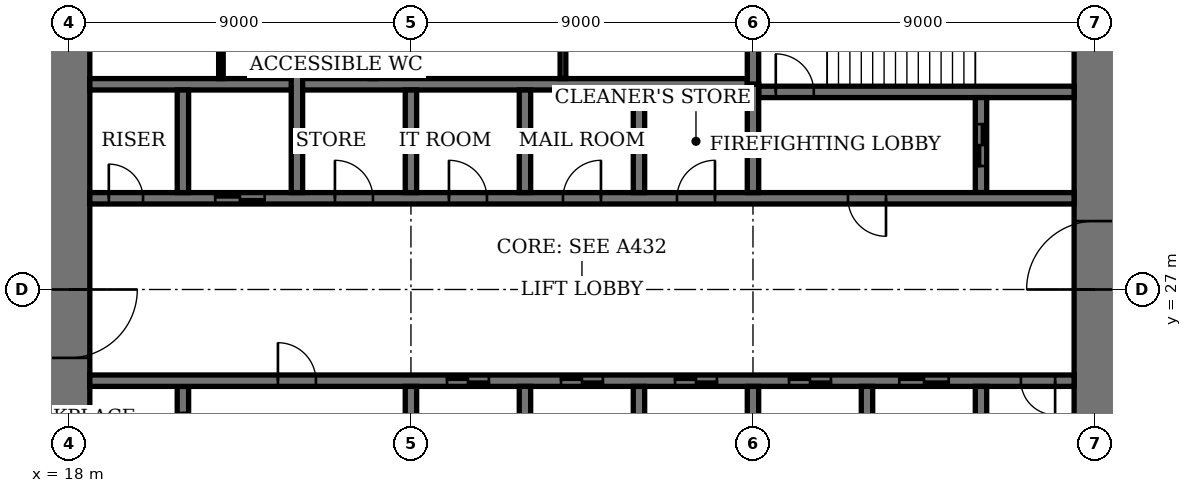
"""IFC4 building model, lengths in metres.
Left out: names, types, materials, properties, quantities, classifications, styles, units other than length and angle.
Written with IfcOpenShell. Run it as: python <this file> out.ifc"""

import sys

from ifc_helpers import new_model, si_unit, direction, frame, frame_2d, origin, place, context, subcontext, project, spatial, rectangle, extrude, element, fill, save


model = new_model("IFC4")
c1 = context("Model", 3, precision=1e-05, world=origin(), true_north=direction((0.0, 1.0)))
c2 = subcontext(c1, "Body", "Model", "MODEL_VIEW")
j1 = project(units=[si_unit("LENGTHUNIT", "METRE"), si_unit("PLANEANGLEUNIT", "RADIAN")], contexts=[c1])
p1 = place(None, origin())
s1 = spatial("IfcSite", under=j1, at=p1, CompositionType="ELEMENT")
p2 = place(p1, origin())
s2 = spatial("IfcBuilding", under=s1, at=p2, CompositionType="ELEMENT")
p3 = place(p2, frame((0.0, 0.0, 303.4)))
s3 = spatial("IfcBuildingStorey", under=s2, at=p3, CompositionType="ELEMENT", Elevation=303.4)
p4 = place(p3, frame((18.0, 35.45, 0.0), z_axis=(0.0, 0.0, 1.0), x_axis=(0.0, -1.0, 0.0)))
e1 = element("IfcWall", 1, at=p4, inside=s3, PredefinedType="SHEAR", context=c2, shape_type="SweptSolid", body=[
    extrude(rectangle(XDim=16.9, YDim=1.1, at=frame_2d((8.45, 0.0))), origin(), (0.0, 0.0, 1.0), 4.0),
])
p5 = place(p4, frame((8.45, 0.0, 0.0)))
e2 = element("IfcOpeningElement", 2, at=p5, cuts=e1, PredefinedType="OPENING", context=c2, shape_type="SweptSolid", body=[
    extrude(rectangle(XDim=1.8, YDim=2.4, at=frame_2d((0.9, 1.2))), frame((0.0, 0.56, 0.0), z_axis=(0.0, -1.0, 0.0), x_axis=(1.0, 0.0, 0.0)), (0.0, 0.0, 1.0), 1.12),
])
p6 = place(p3, frame((45.0, 18.55, 0.0), z_axis=(0.0, 0.0, 1.0), x_axis=(0.0, 1.0, 0.0)))
e3 = element("IfcWall", 3, at=p6, inside=s3, PredefinedType="SHEAR", context=c2, shape_type="SweptSolid", body=[
    extrude(rectangle(XDim=16.9, YDim=1.1, at=frame_2d((8.45, 0.0))), origin(), (0.0, 0.0, 1.0), 4.0),
])
p7 = place(p6, frame((8.45, 0.0, 0.0)))
e4 = element("IfcOpeningElement", 4, at=p7, cuts=e3, PredefinedType="OPENING", context=c2, shape_type="SweptSolid", body=[
    extrude(rectangle(XDim=1.8, YDim=2.4, at=frame_2d((0.9, 1.2))), frame((0.0, 0.56, 0.0), z_axis=(0.0, -1.0, 0.0), x_axis=(1.0, 0.0, 0.0)), (0.0, 0.0, 1.0), 1.12),
])
p8 = place(p3, frame((36.15, 32.2, 0.0), z_axis=(0.0, 0.0, 1.0), x_axis=(1.0, 0.0, 0.0)))
e5 = element("IfcWall", 5, at=p8, inside=s3, PredefinedType="SHEAR", context=c2, shape_type="SweptSolid", body=[
    extrude(rectangle(XDim=8.3, YDim=0.3, at=frame_2d((4.15, 0.0))), origin(), (0.0, 0.0, 1.0), 4.0),
])
p9 = place(p8, frame((0.45, 0.0, 0.0)))
e6 = element("IfcOpeningElement", 6, at=p9, cuts=e5, PredefinedType="OPENING", context=c2, shape_type="SweptSolid", body=[
    extrude(rectangle(XDim=1.0, YDim=2.4, at=frame_2d((0.5, 1.2))), frame((0.0, 0.16, 0.0), z_axis=(0.0, -1.0, 0.0), x_axis=(1.0, 0.0, 0.0)), (0.0, 0.0, 1.0), 0.32),
])
p10 = place(p3, frame((36.0, 32.4, 0.0), z_axis=(0.0, 0.0, 1.0), x_axis=(0.0, 1.0, 0.0)))
e7 = element("IfcWall", 7, at=p10, inside=s3, PredefinedType="SHEAR", context=c2, shape_type="SweptSolid", body=[
    extrude(rectangle(XDim=3.05, YDim=0.3, at=frame_2d((1.525, 0.0))), origin(), (0.0, 0.0, 1.0), 4.0),
])
p11 = place(p3, frame((21.0, 21.95, 0.0), z_axis=(0.0, 0.0, 1.0), x_axis=(0.0, 1.0, 0.0)))
e8 = element("IfcWall", 8, at=p11, inside=s3, PredefinedType="SHEAR", context=c2, shape_type="SweptSolid", body=[
    extrude(rectangle(XDim=2.5, YDim=0.3, at=frame_2d((1.25, 0.0))), origin(), (0.0, 0.0, 1.0), 4.0),
])
p12 = place(p11, frame((0.7, 0.0, 0.0)))
e9 = element("IfcOpeningElement", 9, at=p12, cuts=e8, PredefinedType="OPENING", context=c2, shape_type="SweptSolid", body=[
    extrude(rectangle(XDim=1.1, YDim=2.4, at=frame_2d((0.55, 1.2))), frame((0.0, 0.16, 0.0), z_axis=(0.0, -1.0, 0.0), x_axis=(1.0, 0.0, 0.0)), (0.0, 0.0, 1.0), 0.32),
])
p13 = place(p3, frame((42.0, 29.55, 0.0), z_axis=(0.0, 0.0, 1.0), x_axis=(0.0, 1.0, 0.0)))
e10 = element("IfcWall", 10, at=p13, inside=s3, PredefinedType="SHEAR", context=c2, shape_type="SweptSolid", body=[
    extrude(rectangle(XDim=2.5, YDim=0.3, at=frame_2d((1.25, 0.0))), origin(), (0.0, 0.0, 1.0), 4.0),
])
p14 = place(p13, frame((0.7, 0.0, 0.0)))
e11 = element("IfcOpeningElement", 11, at=p14, cuts=e10, PredefinedType="OPENING", context=c2, shape_type="SweptSolid", body=[
    extrude(rectangle(XDim=1.1, YDim=2.4, at=frame_2d((0.55, 1.2))), frame((0.0, 0.16, 0.0), z_axis=(0.0, -1.0, 0.0), x_axis=(1.0, 0.0, 0.0)), (0.0, 0.0, 1.0), 0.32),
])
p15 = place(p3, frame((18.55, 24.6, 0.0), z_axis=(0.0, 0.0, 1.0), x_axis=(1.0, 0.0, 0.0)))
e12 = element("IfcWall", 12, at=p15, inside=s3, PredefinedType="SHEAR", context=c2, shape_type="SweptSolid", body=[
    extrude(rectangle(XDim=25.9, YDim=0.3, at=frame_2d((12.95, 0.0))), origin(), (0.0, 0.0, 1.0), 4.0),
])
p16 = place(p15, frame((4.95, 0.0, 0.0)))
e13 = element("IfcOpeningElement", 13, at=p16, cuts=e12, PredefinedType="OPENING", context=c2, shape_type="SweptSolid", body=[
    extrude(rectangle(XDim=1.0, YDim=2.4, at=frame_2d((0.5, 1.2))), frame((0.0, 0.16, 0.0), z_axis=(0.0, -1.0, 0.0), x_axis=(1.0, 0.0, 0.0)), (0.0, 0.0, 1.0), 0.32),
])
p17 = place(p15, frame((24.5, 0.0, 0.0)))
e14 = element("IfcOpeningElement", 14, at=p17, cuts=e12, PredefinedType="OPENING", context=c2, shape_type="SweptSolid", body=[
    extrude(rectangle(XDim=0.9, YDim=2.1, at=frame_2d((0.45, 1.05))), frame((0.0, 0.16, 0.0), z_axis=(0.0, -1.0, 0.0), x_axis=(1.0, 0.0, 0.0)), (0.0, 0.0, 1.0), 0.32),
])
p18 = place(p15, frame((9.4, 0.0, 0.0)))
e15 = element("IfcOpeningElement", 15, at=p18, cuts=e12, PredefinedType="OPENING", context=c2, shape_type="SweptSolid", body=[
    extrude(rectangle(XDim=1.1, YDim=2.4, at=frame_2d((0.55, 1.2))), frame((0.0, 0.16, 0.0), z_axis=(0.0, -1.0, 0.0), x_axis=(1.0, 0.0, 0.0)), (0.0, 0.0, 1.0), 0.32),
])
p19 = place(p15, frame((12.4, 0.0, 0.0)))
e16 = element("IfcOpeningElement", 16, at=p19, cuts=e12, PredefinedType="OPENING", context=c2, shape_type="SweptSolid", body=[
    extrude(rectangle(XDim=1.1, YDim=2.4, at=frame_2d((0.55, 1.2))), frame((0.0, 0.16, 0.0), z_axis=(0.0, -1.0, 0.0), x_axis=(1.0, 0.0, 0.0)), (0.0, 0.0, 1.0), 0.32),
])
p20 = place(p15, frame((15.4, 0.0, 0.0)))
e17 = element("IfcOpeningElement", 17, at=p20, cuts=e12, PredefinedType="OPENING", context=c2, shape_type="SweptSolid", body=[
    extrude(rectangle(XDim=1.1, YDim=2.4, at=frame_2d((0.55, 1.2))), frame((0.0, 0.16, 0.0), z_axis=(0.0, -1.0, 0.0), x_axis=(1.0, 0.0, 0.0)), (0.0, 0.0, 1.0), 0.32),
])
p21 = place(p15, frame((18.4, 0.0, 0.0)))
e18 = element("IfcOpeningElement", 18, at=p21, cuts=e12, PredefinedType="OPENING", context=c2, shape_type="SweptSolid", body=[
    extrude(rectangle(XDim=1.1, YDim=2.4, at=frame_2d((0.55, 1.2))), frame((0.0, 0.16, 0.0), z_axis=(0.0, -1.0, 0.0), x_axis=(1.0, 0.0, 0.0)), (0.0, 0.0, 1.0), 0.32),
])
p22 = place(p15, frame((21.3, 0.0, 0.0)))
e19 = element("IfcOpeningElement", 19, at=p22, cuts=e12, PredefinedType="OPENING", context=c2, shape_type="SweptSolid", body=[
    extrude(rectangle(XDim=1.3, YDim=2.4, at=frame_2d((0.65, 1.2))), frame((0.0, 0.16, 0.0), z_axis=(0.0, -1.0, 0.0), x_axis=(1.0, 0.0, 0.0)), (0.0, 0.0, 1.0), 0.32),
])
p23 = place(p3, frame((18.55, 29.4, 0.0), z_axis=(0.0, 0.0, 1.0), x_axis=(1.0, 0.0, 0.0)))
e20 = element("IfcWall", 20, at=p23, inside=s3, PredefinedType="SHEAR", context=c2, shape_type="SweptSolid", body=[
    extrude(rectangle(XDim=25.9, YDim=0.3, at=frame_2d((12.95, 0.0))), origin(), (0.0, 0.0, 1.0), 4.0),
])
p24 = place(p23, frame((19.95, 0.0, 0.0)))
e21 = element("IfcOpeningElement", 21, at=p24, cuts=e20, PredefinedType="OPENING", context=c2, shape_type="SweptSolid", body=[
    extrude(rectangle(XDim=1.0, YDim=2.4, at=frame_2d((0.5, 1.2))), frame((0.0, 0.16, 0.0), z_axis=(0.0, -1.0, 0.0), x_axis=(1.0, 0.0, 0.0)), (0.0, 0.0, 1.0), 0.32),
])
p25 = place(p23, frame((0.5, 0.0, 0.0)))
e22 = element("IfcOpeningElement", 22, at=p25, cuts=e20, PredefinedType="OPENING", context=c2, shape_type="SweptSolid", body=[
    extrude(rectangle(XDim=0.9, YDim=2.1, at=frame_2d((0.45, 1.05))), frame((0.0, 0.16, 0.0), z_axis=(0.0, -1.0, 0.0), x_axis=(1.0, 0.0, 0.0)), (0.0, 0.0, 1.0), 0.32),
])
p26 = place(p23, frame((15.45, 0.0, 0.0)))
e23 = element("IfcOpeningElement", 23, at=p26, cuts=e20, PredefinedType="OPENING", context=c2, shape_type="SweptSolid", body=[
    extrude(rectangle(XDim=1.0, YDim=2.4, at=frame_2d((0.5, 1.2))), frame((0.0, 0.16, 0.0), z_axis=(0.0, -1.0, 0.0), x_axis=(1.0, 0.0, 0.0)), (0.0, 0.0, 1.0), 0.32),
])
p27 = place(p23, frame((12.45, 0.0, 0.0)))
e24 = element("IfcOpeningElement", 24, at=p27, cuts=e20, PredefinedType="OPENING", context=c2, shape_type="SweptSolid", body=[
    extrude(rectangle(XDim=1.0, YDim=2.4, at=frame_2d((0.5, 1.2))), frame((0.0, 0.16, 0.0), z_axis=(0.0, -1.0, 0.0), x_axis=(1.0, 0.0, 0.0)), (0.0, 0.0, 1.0), 0.32),
])
p28 = place(p23, frame((9.45, 0.0, 0.0)))
e25 = element("IfcOpeningElement", 25, at=p28, cuts=e20, PredefinedType="OPENING", context=c2, shape_type="SweptSolid", body=[
    extrude(rectangle(XDim=1.0, YDim=2.4, at=frame_2d((0.5, 1.2))), frame((0.0, 0.16, 0.0), z_axis=(0.0, -1.0, 0.0), x_axis=(1.0, 0.0, 0.0)), (0.0, 0.0, 1.0), 0.32),
])
p29 = place(p23, frame((6.45, 0.0, 0.0)))
e26 = element("IfcOpeningElement", 26, at=p29, cuts=e20, PredefinedType="OPENING", context=c2, shape_type="SweptSolid", body=[
    extrude(rectangle(XDim=1.0, YDim=2.4, at=frame_2d((0.5, 1.2))), frame((0.0, 0.16, 0.0), z_axis=(0.0, -1.0, 0.0), x_axis=(1.0, 0.0, 0.0)), (0.0, 0.0, 1.0), 0.32),
])
p30 = place(p23, frame((3.3, 0.0, 0.0)))
e27 = element("IfcOpeningElement", 27, at=p30, cuts=e20, PredefinedType="OPENING", context=c2, shape_type="SweptSolid", body=[
    extrude(rectangle(XDim=1.3, YDim=2.4, at=frame_2d((0.65, 1.2))), frame((0.0, 0.16, 0.0), z_axis=(0.0, -1.0, 0.0), x_axis=(1.0, 0.0, 0.0)), (0.0, 0.0, 1.0), 0.32),
])
p31 = place(p3, frame((18.55, 32.4, 0.0), z_axis=(0.0, 0.0, 1.0), x_axis=(1.0, 0.0, 0.0)))
e28 = element("IfcWall", 28, at=p31, inside=s3, PredefinedType="SHEAR", context=c2, shape_type="SweptSolid", body=[
    extrude(rectangle(XDim=17.3, YDim=0.3, at=frame_2d((8.65, 0.0))), origin(), (0.0, 0.0, 1.0), 4.0),
])
for number, where, z_axis, x_axis in (
    (29, (30.0, 21.75, 0.0), (0.0, 0.0, 1.0), (0.0, 1.0, 0.0)),
    (30, (33.0, 29.55, 0.0), (0.0, 0.0, 1.0), (0.0, 1.0, 0.0)),
    (31, (33.0, 21.75, 0.0), (0.0, 0.0, 1.0), (0.0, 1.0, 0.0)),
    (32, (30.0, 29.55, 0.0), (0.0, 0.0, 1.0), (0.0, 1.0, 0.0)),
    (33, (36.0, 21.75, 0.0), (0.0, 0.0, 1.0), (0.0, 1.0, 0.0)),
    (34, (27.0, 29.55, 0.0), (0.0, 0.0, 1.0), (0.0, 1.0, 0.0)),
):
    element("IfcWall", number, at=place(p3, frame(where, z_axis=z_axis, x_axis=x_axis)), inside=s3, PredefinedType="SHEAR", context=c2, shape_type="SweptSolid", body=[
        extrude(rectangle(XDim=2.7, YDim=0.3, at=frame_2d((1.35, 0.0))), origin(), (0.0, 0.0, 1.0), 4.0),
    ])
for number, where, z_axis, x_axis in (
    (35, (39.0, 18.55, 0.0), (0.0, 0.0, 1.0), (0.0, 1.0, 0.0)),
    (36, (24.0, 29.55, 0.0), (0.0, 0.0, 1.0), (0.0, 1.0, 0.0)),
):
    element("IfcWall", number, at=place(p3, frame(where, z_axis=z_axis, x_axis=x_axis)), inside=s3, PredefinedType="SHEAR", context=c2, shape_type="SweptSolid", body=[
        extrude(rectangle(XDim=5.9, YDim=0.3, at=frame_2d((2.95, 0.0))), origin(), (0.0, 0.0, 1.0), 4.0),
    ])
for number, where, z_axis, x_axis in (
    (37, (42.0, 21.75, 0.0), (0.0, 0.0, 1.0), (0.0, 1.0, 0.0)),
    (38, (21.0, 29.55, 0.0), (0.0, 0.0, 1.0), (0.0, 1.0, 0.0)),
):
    element("IfcWall", number, at=place(p3, frame(where, z_axis=z_axis, x_axis=x_axis)), inside=s3, PredefinedType="SHEAR", context=c2, shape_type="SweptSolid", body=[
        extrude(rectangle(XDim=2.7, YDim=0.3, at=frame_2d((1.35, 0.0))), origin(), (0.0, 0.0, 1.0), 4.0),
    ])
for number, where, z_axis, x_axis in (
    (39, (27.0, 21.6, 0.0), (0.0, 0.0, 1.0), (0.0, 1.0, 0.0)),
    (40, (36.0, 29.55, 0.0), (0.0, 0.0, 1.0), (0.0, 1.0, 0.0)),
):
    element("IfcWall", number, at=place(p3, frame(where, z_axis=z_axis, x_axis=x_axis)), inside=s3, PredefinedType="SHEAR", context=c2, shape_type="SweptSolid", body=[
        extrude(rectangle(XDim=2.85, YDim=0.3, at=frame_2d((1.425, 0.0))), origin(), (0.0, 0.0, 1.0), 4.0),
    ])
for number, where, z_axis, x_axis in (
    (41, (31.0, 32.55, 0.0), (0.0, 0.0, 1.0), (0.0, 1.0, 0.0)),
    (42, (26.0, 32.55, 0.0), (0.0, 0.0, 1.0), (0.0, 1.0, 0.0)),
):
    element("IfcWall", number, at=place(p3, frame(where, z_axis=z_axis, x_axis=x_axis)), inside=s3, PredefinedType="PARTITIONING", context=c2, shape_type="SweptSolid", body=[
        extrude(rectangle(XDim=2.9, YDim=0.15, at=frame_2d((1.45, 0.0))), origin(), (0.0, 0.0, 1.0), 3.75),
    ])
p32 = place(p3, frame((22.0, 32.55, 0.0), z_axis=(0.0, 0.0, 1.0), x_axis=(0.0, 1.0, 0.0)))
e43 = element("IfcWall", 43, at=p32, inside=s3, PredefinedType="PARTITIONING", context=c2, shape_type="SweptSolid", body=[
    extrude(rectangle(XDim=2.9, YDim=0.12, at=frame_2d((1.45, 0.0))), origin(), (0.0, 0.0, 1.0), 3.75),
])
p33 = place(p32, frame((0.95, 0.0, 0.0)))
e44 = element("IfcOpeningElement", 44, at=p33, cuts=e43, PredefinedType="OPENING", context=c2, shape_type="SweptSolid", body=[
    extrude(rectangle(XDim=1.0, YDim=2.4, at=frame_2d((0.5, 1.2))), frame((0.0, 0.07, 0.0), z_axis=(0.0, -1.0, 0.0), x_axis=(1.0, 0.0, 0.0)), (0.0, 0.0, 1.0), 0.14),
])
p34 = place(p5, origin())
e45 = element("IfcDoor", 45, at=p34, inside=s3, OperationType="DOUBLE_DOOR_DOUBLE_SWING", PredefinedType="DOOR", context=c2, shape_type="SweptSolid", body=[
    extrude(rectangle(XDim=1.8, YDim=2.4, at=frame_2d((0.9, 1.2))), frame((0.0, 0.03, 0.0), z_axis=(0.0, -1.0, 0.0), x_axis=(1.0, 0.0, 0.0)), (0.0, 0.0, 1.0), 0.06),
    extrude(rectangle(XDim=0.04, YDim=2.4, at=frame_2d((0.02, 1.2))), frame((0.0, 0.55, 0.0), z_axis=(0.0, -1.0, 0.0), x_axis=(1.0, 0.0, 0.0)), (0.0, 0.0, 1.0), 1.1),
    extrude(rectangle(XDim=0.04, YDim=2.4, at=frame_2d((1.78, 1.2))), frame((0.0, 0.55, 0.0), z_axis=(0.0, -1.0, 0.0), x_axis=(1.0, 0.0, 0.0)), (0.0, 0.0, 1.0), 1.1),
    extrude(rectangle(XDim=1.8, YDim=0.04, at=frame_2d((0.9, 2.38))), frame((0.0, 0.55, 0.0), z_axis=(0.0, -1.0, 0.0), x_axis=(1.0, 0.0, 0.0)), (0.0, 0.0, 1.0), 1.1),
])
fill(e2, e45)
p35 = place(p7, origin())
e46 = element("IfcDoor", 46, at=p35, inside=s3, OperationType="DOUBLE_DOOR_DOUBLE_SWING", PredefinedType="DOOR", context=c2, shape_type="SweptSolid", body=[
    extrude(rectangle(XDim=1.8, YDim=2.4, at=frame_2d((0.9, 1.2))), frame((0.0, 0.03, 0.0), z_axis=(0.0, -1.0, 0.0), x_axis=(1.0, 0.0, 0.0)), (0.0, 0.0, 1.0), 0.06),
    extrude(rectangle(XDim=0.04, YDim=2.4, at=frame_2d((0.02, 1.2))), frame((0.0, 0.55, 0.0), z_axis=(0.0, -1.0, 0.0), x_axis=(1.0, 0.0, 0.0)), (0.0, 0.0, 1.0), 1.1),
    extrude(rectangle(XDim=0.04, YDim=2.4, at=frame_2d((1.78, 1.2))), frame((0.0, 0.55, 0.0), z_axis=(0.0, -1.0, 0.0), x_axis=(1.0, 0.0, 0.0)), (0.0, 0.0, 1.0), 1.1),
    extrude(rectangle(XDim=1.8, YDim=0.04, at=frame_2d((0.9, 2.38))), frame((0.0, 0.55, 0.0), z_axis=(0.0, -1.0, 0.0), x_axis=(1.0, 0.0, 0.0)), (0.0, 0.0, 1.0), 1.1),
])
fill(e4, e46)
p36 = place(p9, origin())
e47 = element("IfcDoor", 47, at=p36, inside=s3, OperationType="SINGLE_SWING_RIGHT", PredefinedType="DOOR", context=c2, shape_type="SweptSolid", body=[
    extrude(rectangle(XDim=1.0, YDim=2.4, at=frame_2d((0.5, 1.2))), frame((0.0, 0.03, 0.0), z_axis=(0.0, -1.0, 0.0), x_axis=(1.0, 0.0, 0.0)), (0.0, 0.0, 1.0), 0.06),
])
fill(e6, e47)
p37 = place(p16, origin())
e48 = element("IfcDoor", 48, at=p37, inside=s3, OperationType="SINGLE_SWING_RIGHT", PredefinedType="DOOR", context=c2, shape_type="SweptSolid", body=[
    extrude(rectangle(XDim=1.0, YDim=2.4, at=frame_2d((0.5, 1.2))), frame((0.0, 0.03, 0.0), z_axis=(0.0, -1.0, 0.0), x_axis=(1.0, 0.0, 0.0)), (0.0, 0.0, 1.0), 0.06),
])
fill(e13, e48)
p38 = place(p24, origin())
e49 = element("IfcDoor", 49, at=p38, inside=s3, OperationType="SINGLE_SWING_RIGHT", PredefinedType="DOOR", context=c2, shape_type="SweptSolid", body=[
    extrude(rectangle(XDim=1.0, YDim=2.4, at=frame_2d((0.5, 1.2))), frame((0.0, 0.03, 0.0), z_axis=(0.0, -1.0, 0.0), x_axis=(1.0, 0.0, 0.0)), (0.0, 0.0, 1.0), 0.06),
])
fill(e21, e49)
p39 = place(p17, origin())
e50 = element("IfcDoor", 50, at=p39, inside=s3, OperationType="SINGLE_SWING_RIGHT", PredefinedType="DOOR", context=c2, shape_type="SweptSolid", body=[
    extrude(rectangle(XDim=0.9, YDim=2.1, at=frame_2d((0.45, 1.05))), frame((0.0, 0.03, 0.0), z_axis=(0.0, -1.0, 0.0), x_axis=(1.0, 0.0, 0.0)), (0.0, 0.0, 1.0), 0.06),
])
fill(e14, e50)
p40 = place(p25, origin())
e51 = element("IfcDoor", 51, at=p40, inside=s3, OperationType="SINGLE_SWING_RIGHT", PredefinedType="DOOR", context=c2, shape_type="SweptSolid", body=[
    extrude(rectangle(XDim=0.9, YDim=2.1, at=frame_2d((0.45, 1.05))), frame((0.0, 0.03, 0.0), z_axis=(0.0, -1.0, 0.0), x_axis=(1.0, 0.0, 0.0)), (0.0, 0.0, 1.0), 0.06),
])
fill(e22, e51)
p41 = place(p18, origin())
e52 = element("IfcDoor", 52, at=p41, inside=s3, OperationType="DOUBLE_DOOR_SLIDING", PredefinedType="DOOR", context=c2, shape_type="SweptSolid", body=[
    extrude(rectangle(XDim=1.1, YDim=2.4, at=frame_2d((0.55, 1.2))), frame((0.0, 0.02, 0.0), z_axis=(0.0, -1.0, 0.0), x_axis=(1.0, 0.0, 0.0)), (0.0, 0.0, 1.0), 0.04),
])
fill(e15, e52)
p42 = place(p19, origin())
e53 = element("IfcDoor", 53, at=p42, inside=s3, OperationType="DOUBLE_DOOR_SLIDING", PredefinedType="DOOR", context=c2, shape_type="SweptSolid", body=[
    extrude(rectangle(XDim=1.1, YDim=2.4, at=frame_2d((0.55, 1.2))), frame((0.0, 0.02, 0.0), z_axis=(0.0, -1.0, 0.0), x_axis=(1.0, 0.0, 0.0)), (0.0, 0.0, 1.0), 0.04),
])
fill(e16, e53)
p43 = place(p20, origin())
e54 = element("IfcDoor", 54, at=p43, inside=s3, OperationType="DOUBLE_DOOR_SLIDING", PredefinedType="DOOR", context=c2, shape_type="SweptSolid", body=[
    extrude(rectangle(XDim=1.1, YDim=2.4, at=frame_2d((0.55, 1.2))), frame((0.0, 0.02, 0.0), z_axis=(0.0, -1.0, 0.0), x_axis=(1.0, 0.0, 0.0)), (0.0, 0.0, 1.0), 0.04),
])
fill(e17, e54)
p44 = place(p21, origin())
e55 = element("IfcDoor", 55, at=p44, inside=s3, OperationType="DOUBLE_DOOR_SLIDING", PredefinedType="DOOR", context=c2, shape_type="SweptSolid", body=[
    extrude(rectangle(XDim=1.1, YDim=2.4, at=frame_2d((0.55, 1.2))), frame((0.0, 0.02, 0.0), z_axis=(0.0, -1.0, 0.0), x_axis=(1.0, 0.0, 0.0)), (0.0, 0.0, 1.0), 0.04),
])
fill(e18, e55)
p45 = place(p26, origin())
e56 = element("IfcDoor", 56, at=p45, inside=s3, OperationType="SINGLE_SWING_LEFT", PredefinedType="DOOR", context=c2, shape_type="SweptSolid", body=[
    extrude(rectangle(XDim=1.0, YDim=2.4, at=frame_2d((0.5, 1.2))), frame((0.0, 0.03, 0.0), z_axis=(0.0, -1.0, 0.0), x_axis=(1.0, 0.0, 0.0)), (0.0, 0.0, 1.0), 0.06),
])
fill(e23, e56)
p46 = place(p27, origin())
e57 = element("IfcDoor", 57, at=p46, inside=s3, OperationType="SINGLE_SWING_LEFT", PredefinedType="DOOR", context=c2, shape_type="SweptSolid", body=[
    extrude(rectangle(XDim=1.0, YDim=2.4, at=frame_2d((0.5, 1.2))), frame((0.0, 0.03, 0.0), z_axis=(0.0, -1.0, 0.0), x_axis=(1.0, 0.0, 0.0)), (0.0, 0.0, 1.0), 0.06),
])
fill(e24, e57)
p47 = place(p28, origin())
e58 = element("IfcDoor", 58, at=p47, inside=s3, OperationType="SINGLE_SWING_RIGHT", PredefinedType="DOOR", context=c2, shape_type="SweptSolid", body=[
    extrude(rectangle(XDim=1.0, YDim=2.4, at=frame_2d((0.5, 1.2))), frame((0.0, 0.03, 0.0), z_axis=(0.0, -1.0, 0.0), x_axis=(1.0, 0.0, 0.0)), (0.0, 0.0, 1.0), 0.06),
])
fill(e25, e58)
p48 = place(p29, origin())
e59 = element("IfcDoor", 59, at=p48, inside=s3, OperationType="SINGLE_SWING_RIGHT", PredefinedType="DOOR", context=c2, shape_type="SweptSolid", body=[
    extrude(rectangle(XDim=1.0, YDim=2.4, at=frame_2d((0.5, 1.2))), frame((0.0, 0.03, 0.0), z_axis=(0.0, -1.0, 0.0), x_axis=(1.0, 0.0, 0.0)), (0.0, 0.0, 1.0), 0.06),
])
fill(e26, e59)
p49 = place(p22, origin())
e60 = element("IfcDoor", 60, at=p49, inside=s3, OperationType="DOUBLE_DOOR_SLIDING", PredefinedType="DOOR", context=c2, shape_type="SweptSolid", body=[
    extrude(rectangle(XDim=1.3, YDim=2.4, at=frame_2d((0.65, 1.2))), frame((0.0, 0.02, 0.0), z_axis=(0.0, -1.0, 0.0), x_axis=(1.0, 0.0, 0.0)), (0.0, 0.0, 1.0), 0.04),
])
fill(e19, e60)
p50 = place(p30, origin())
e61 = element("IfcDoor", 61, at=p50, inside=s3, OperationType="DOUBLE_DOOR_SLIDING", PredefinedType="DOOR", context=c2, shape_type="SweptSolid", body=[
    extrude(rectangle(XDim=1.3, YDim=2.4, at=frame_2d((0.65, 1.2))), frame((0.0, 0.02, 0.0), z_axis=(0.0, -1.0, 0.0), x_axis=(1.0, 0.0, 0.0)), (0.0, 0.0, 1.0), 0.04),
])
fill(e27, e61)
p51 = place(p14, origin())
e62 = element("IfcDoor", 62, at=p51, inside=s3, OperationType="DOUBLE_DOOR_SLIDING", PredefinedType="DOOR", context=c2, shape_type="SweptSolid", body=[
    extrude(rectangle(XDim=1.1, YDim=2.4, at=frame_2d((0.55, 1.2))), frame((0.0, 0.03, 0.0), z_axis=(0.0, -1.0, 0.0), x_axis=(1.0, 0.0, 0.0)), (0.0, 0.0, 1.0), 0.06),
])
fill(e11, e62)
save(model, sys.argv[1])
